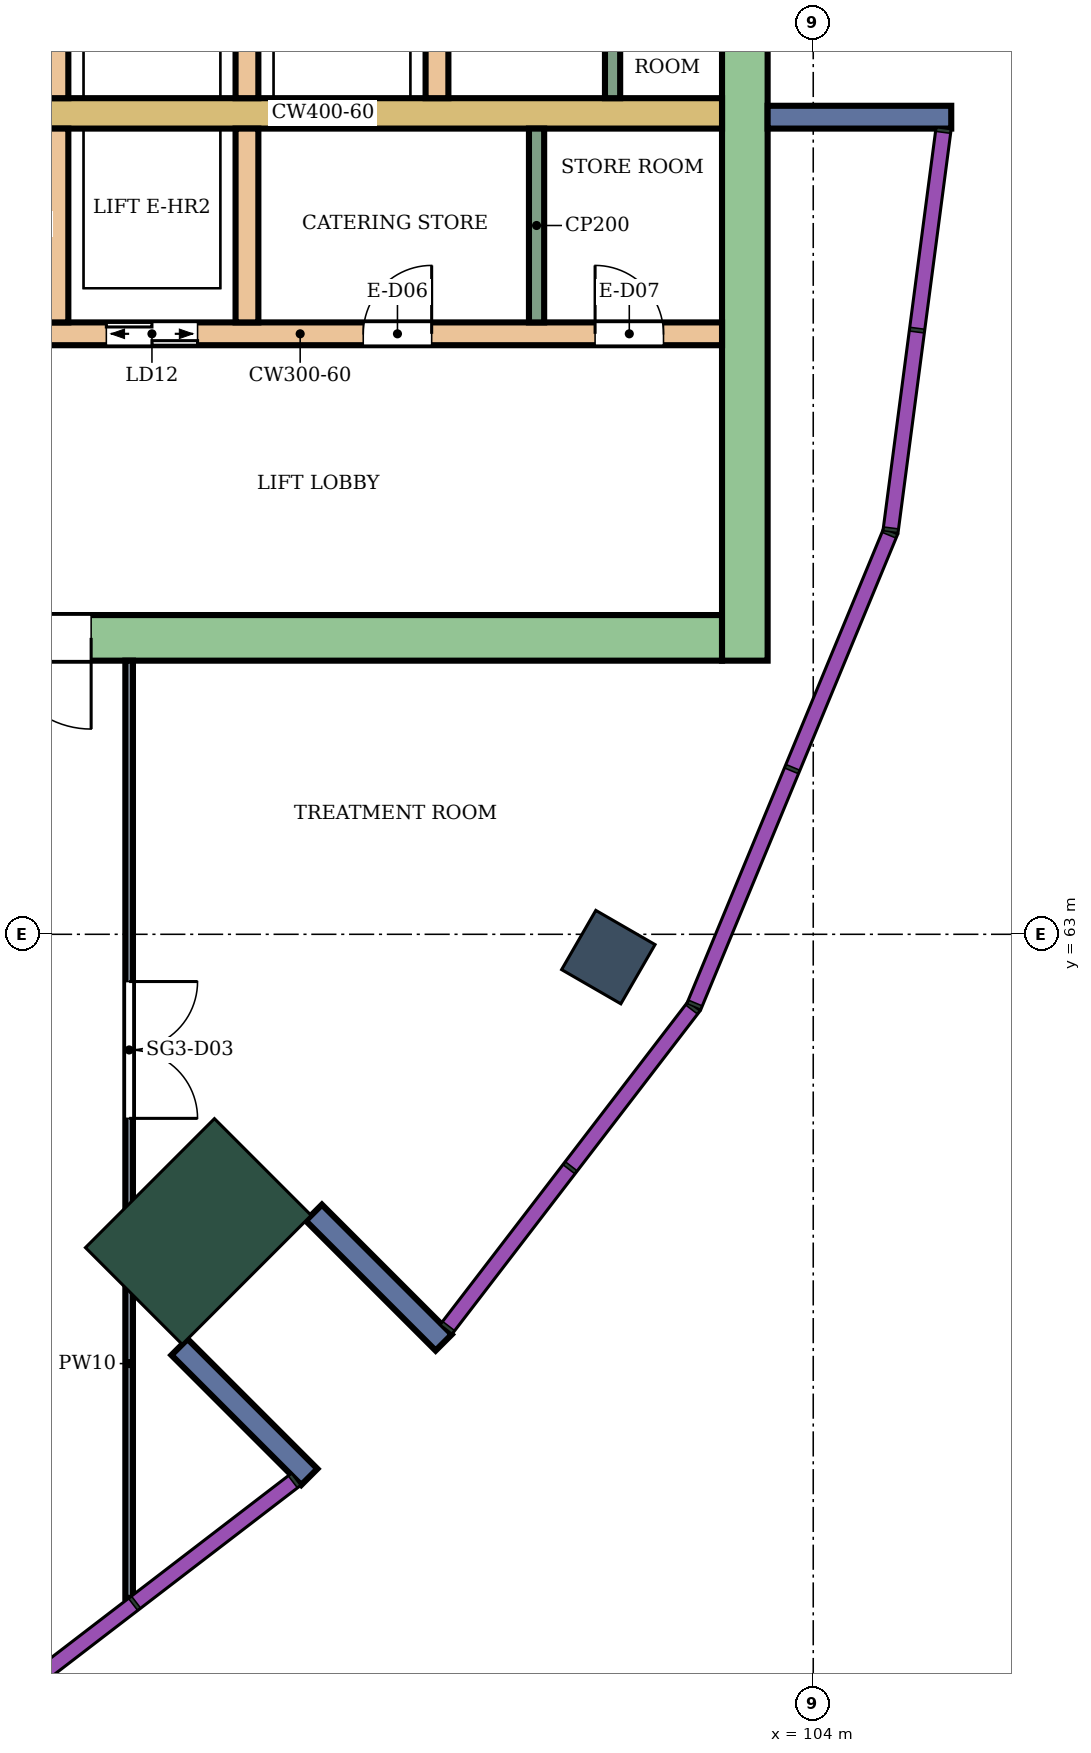
"""IFC4 building model, lengths in metres.
Left out: names, types, materials, properties, quantities, classifications, styles, units other than length and angle.
Written with IfcOpenShell. Run it as: python <this file> out.ifc"""

import sys

from ifc_helpers import new_model, si_unit, direction, frame, frame_2d, origin, origin_2d, place, context, subcontext, project, spatial, rectangle, extrude, element, fill, save


model = new_model("IFC4")
c1 = context("Model", 3, precision=1e-05, world=origin(), true_north=direction((0.0, 1.0)))
c2 = subcontext(c1, "Body", "Model", "MODEL_VIEW")
j1 = project(units=[si_unit("LENGTHUNIT", "METRE"), si_unit("PLANEANGLEUNIT", "RADIAN")], contexts=[c1])
p1 = place(None, origin())
s1 = spatial("IfcSite", under=j1, at=p1, CompositionType="ELEMENT")
p2 = place(p1, origin())
s2 = spatial("IfcBuilding", under=s1, at=p2, CompositionType="ELEMENT")
p3 = place(p2, frame((0.0, 0.0, 229.3)))
s3 = spatial("IfcBuildingStorey", under=s2, at=p3, CompositionType="ELEMENT", Elevation=229.3)
p4 = place(p3, frame((101.304, 62.7, 0.0), z_axis=(0.0, 0.0, 1.0), x_axis=(0.866025403784, -0.5, 0.0)))
e1 = element("IfcColumn", 1, at=p4, inside=s3, PredefinedType="COLUMN", context=c2, shape_type="SweptSolid", body=[
    extrude(rectangle(XDim=0.9, YDim=0.9, at=origin_2d()), origin(), (0.0, 0.0, 1.0), 8.0),
])
p5 = place(p3, frame((95.91, 59.09, 0.0), z_axis=(0.0, 0.0, 1.0), x_axis=(0.707106781187, -0.707106781187, 0.0)))
e2 = element("IfcColumn", 2, at=p5, inside=s3, PredefinedType="COLUMN", context=c2, shape_type="SweptSolid", body=[
    extrude(rectangle(XDim=1.8, YDim=2.4, at=origin_2d()), origin(), (0.0, 0.0, 1.0), 8.0),
])
p6 = place(p3, frame((87.9, 66.9, 0.0), z_axis=(0.0, 0.0, 1.0), x_axis=(1.0, 0.0, 0.0)))
e3 = element("IfcWall", 3, at=p6, inside=s3, PredefinedType="SHEAR", context=c2, shape_type="SweptSolid", body=[
    extrude(rectangle(XDim=14.9, YDim=0.6, at=frame_2d((7.45, 0.0))), origin(), (0.0, 0.0, 1.0), 7.68),
])
p7 = place(p6, frame((4.2, 0.0, 0.0)))
e4 = element("IfcOpeningElement", 4, at=p7, cuts=e3, PredefinedType="OPENING", context=c2, shape_type="SweptSolid", body=[
    extrude(rectangle(XDim=2.4, YDim=2.4, at=frame_2d((1.2, 1.2))), frame((0.0, 0.31, 0.0), z_axis=(0.0, -1.0, 0.0), x_axis=(1.0, 0.0, 0.0)), (0.0, 0.0, 1.0), 0.62),
])
p8 = place(p3, frame((103.1, 66.6, 0.0), z_axis=(0.0, 0.0, 1.0), x_axis=(0.0, 1.0, 0.0)))
e5 = element("IfcWall", 5, at=p8, inside=s3, PredefinedType="SHEAR", context=c2, shape_type="SweptSolid", body=[
    extrude(rectangle(XDim=16.8, YDim=0.6, at=frame_2d((8.4, 0.0))), origin(), (0.0, 0.0, 1.0), 7.68),
])
p9 = place(p3, frame((91.7, 73.8, 0.0), z_axis=(0.0, 0.0, 1.0), x_axis=(1.0, 0.0, 0.0)))
e6 = element("IfcWall", 6, at=p9, inside=s3, PredefinedType="SHEAR", context=c2, shape_type="SweptSolid", body=[
    extrude(rectangle(XDim=11.1, YDim=0.4, at=frame_2d((5.55, 0.0))), origin(), (0.0, 0.0, 1.0), 7.68),
])
p10 = place(p3, frame((91.7, 70.9, 0.0), z_axis=(0.0, 0.0, 1.0), x_axis=(1.0, 0.0, 0.0)))
e7 = element("IfcWall", 7, at=p10, inside=s3, PredefinedType="SHEAR", context=c2, shape_type="SweptSolid", body=[
    extrude(rectangle(XDim=11.1, YDim=0.3, at=frame_2d((5.55, 0.0))), origin(), (0.0, 0.0, 1.0), 7.68),
])
p11 = place(p10, frame((0.4, 0.0, 0.0)))
e8 = element("IfcOpeningElement", 8, at=p11, cuts=e7, PredefinedType="OPENING", context=c2, shape_type="SweptSolid", body=[
    extrude(rectangle(XDim=1.4, YDim=2.1, at=frame_2d((0.7, 1.05))), frame((0.0, 0.16, 0.0), z_axis=(0.0, -1.0, 0.0), x_axis=(1.0, 0.0, 0.0)), (0.0, 0.0, 1.0), 0.32),
])
p12 = place(p10, frame((3.0, 0.0, 0.0)))
e9 = element("IfcOpeningElement", 9, at=p12, cuts=e7, PredefinedType="OPENING", context=c2, shape_type="SweptSolid", body=[
    extrude(rectangle(XDim=1.2, YDim=2.1, at=frame_2d((0.6, 1.05))), frame((0.0, 0.16, 0.0), z_axis=(0.0, -1.0, 0.0), x_axis=(1.0, 0.0, 0.0)), (0.0, 0.0, 1.0), 0.32),
])
p13 = place(p10, frame((6.38, 0.0, 0.0)))
e10 = element("IfcOpeningElement", 10, at=p13, cuts=e7, PredefinedType="OPENING", context=c2, shape_type="SweptSolid", body=[
    extrude(rectangle(XDim=0.9, YDim=2.1, at=frame_2d((0.45, 1.05))), frame((0.0, 0.16, 0.0), z_axis=(0.0, -1.0, 0.0), x_axis=(1.0, 0.0, 0.0)), (0.0, 0.0, 1.0), 0.32),
])
p14 = place(p10, frame((9.43, 0.0, 0.0)))
e11 = element("IfcOpeningElement", 11, at=p14, cuts=e7, PredefinedType="OPENING", context=c2, shape_type="SweptSolid", body=[
    extrude(rectangle(XDim=0.9, YDim=2.1, at=frame_2d((0.45, 1.05))), frame((0.0, 0.16, 0.0), z_axis=(0.0, -1.0, 0.0), x_axis=(1.0, 0.0, 0.0)), (0.0, 0.0, 1.0), 0.32),
])
for number, where, z_axis, x_axis in (
    (12, (94.05, 74.0, 0.0), (0.0, 0.0, 1.0), (0.0, 1.0, 0.0)),
    (13, (96.55, 74.0, 0.0), (0.0, 0.0, 1.0), (0.0, 1.0, 0.0)),
    (14, (99.05, 74.0, 0.0), (0.0, 0.0, 1.0), (0.0, 1.0, 0.0)),
    (15, (94.05, 71.05, 0.0), (0.0, 0.0, 1.0), (0.0, 1.0, 0.0)),
    (16, (96.55, 71.05, 0.0), (0.0, 0.0, 1.0), (0.0, 1.0, 0.0)),
):
    element("IfcWall", number, at=place(p3, frame(where, z_axis=z_axis, x_axis=x_axis)), inside=s3, PredefinedType="SHEAR", context=c2, shape_type="SweptSolid", body=[
        extrude(rectangle(XDim=2.55, YDim=0.3, at=frame_2d((1.275, 0.0))), origin(), (0.0, 0.0, 1.0), 7.68),
    ])
for number, where, z_axis, x_axis in (
    (17, (103.4, 73.75, 0.0), (0.0, 0.0, 1.0), (1.0, 0.0, 0.0)),
    (18, (95.662, 57.57, 0.0), (0.0, 0.0, 1.0), (0.707, -0.707, 0.0)),
    (19, (97.43, 59.338, 0.0), (0.0, 0.0, 1.0), (0.707, -0.707, 0.0)),
):
    element("IfcWall", number, at=place(p3, frame(where, z_axis=z_axis, x_axis=x_axis)), inside=s3, PredefinedType="NOTDEFINED", context=c2, shape_type="SweptSolid", body=[
        extrude(rectangle(XDim=2.416, YDim=0.3, at=frame_2d((1.208, 0.0))), origin(), (0.0, 0.0, 1.0), 8.0),
    ])
p15 = place(p3, frame((95.0, 54.27, 0.0), z_axis=(0.0, 0.0, 1.0), x_axis=(0.0, 1.0, 0.0)))
e20 = element("IfcWall", 20, at=p15, inside=s3, PredefinedType="PARTITIONING", context=c2, shape_type="SweptSolid", body=[
    extrude(rectangle(XDim=12.33, YDim=0.1, at=frame_2d((6.165, 0.0))), origin(), (0.0, 0.0, 1.0), 7.55),
])
p16 = place(p15, frame((6.309, 0.0, 0.0)))
e21 = element("IfcOpeningElement", 21, at=p16, cuts=e20, PredefinedType="OPENING", context=c2, shape_type="SweptSolid", body=[
    extrude(rectangle(XDim=1.8, YDim=2.1, at=frame_2d((0.9, 1.05))), frame((0.0, 0.06, 0.0), z_axis=(0.0, -1.0, 0.0), x_axis=(1.0, 0.0, 0.0)), (0.0, 0.0, 1.0), 0.12),
])
for number, where, z_axis, x_axis in (
    (22, (101.36, 74.0, 0.0), (0.0, 0.0, 1.0), (0.0, 1.0, 0.0)),
    (23, (100.36, 71.05, 0.0), (0.0, 0.0, 1.0), (0.0, 1.0, 0.0)),
):
    element("IfcWall", number, at=place(p3, frame(where, z_axis=z_axis, x_axis=x_axis)), inside=s3, PredefinedType="PARTITIONING", context=c2, shape_type="SweptSolid", body=[
        extrude(rectangle(XDim=2.55, YDim=0.2, at=frame_2d((1.275, 0.0))), origin(), (0.0, 0.0, 1.0), 7.68),
    ])
p17 = place(p16, frame((1.8, 0.0, 0.0), z_axis=(0.0, 0.0, 1.0), x_axis=(-1.0, 0.0, 0.0)))
e24 = element("IfcDoor", 24, at=p17, inside=s3, OperationType="DOUBLE_DOOR_SINGLE_SWING", PredefinedType="DOOR", context=c2, shape_type="SweptSolid", body=[
    extrude(rectangle(XDim=1.8, YDim=2.1, at=frame_2d((0.9, 1.05))), frame((0.0, 0.025, 0.0), z_axis=(0.0, -1.0, 0.0), x_axis=(1.0, 0.0, 0.0)), (0.0, 0.0, 1.0), 0.05),
])
fill(e21, e24)
p18 = place(p12, origin())
e25 = element("IfcDoor", 25, at=p18, inside=s3, OperationType="DOUBLE_DOOR_SLIDING", PredefinedType="DOOR", context=c2, shape_type="SweptSolid", body=[
    extrude(rectangle(XDim=1.2, YDim=2.1, at=frame_2d((0.6, 1.05))), frame((0.0, 0.025, 0.0), z_axis=(0.0, -1.0, 0.0), x_axis=(1.0, 0.0, 0.0)), (0.0, 0.0, 1.0), 0.05),
])
fill(e9, e25)
p19 = place(p13, origin())
e26 = element("IfcDoor", 26, at=p19, inside=s3, OperationType="SINGLE_SWING_RIGHT", PredefinedType="DOOR", context=c2, shape_type="SweptSolid", body=[
    extrude(rectangle(XDim=0.9, YDim=2.1, at=frame_2d((0.45, 1.05))), frame((0.0, 0.025, 0.0), z_axis=(0.0, -1.0, 0.0), x_axis=(1.0, 0.0, 0.0)), (0.0, 0.0, 1.0), 0.05),
])
fill(e10, e26)
p20 = place(p14, origin())
e27 = element("IfcDoor", 27, at=p20, inside=s3, OperationType="SINGLE_SWING_LEFT", PredefinedType="DOOR", context=c2, shape_type="SweptSolid", body=[
    extrude(rectangle(XDim=0.9, YDim=2.1, at=frame_2d((0.45, 1.05))), frame((0.0, 0.025, 0.0), z_axis=(0.0, -1.0, 0.0), x_axis=(1.0, 0.0, 0.0)), (0.0, 0.0, 1.0), 0.05),
])
fill(e11, e27)
p21 = place(p7, frame((2.4, 0.0, 0.0), z_axis=(0.0, 0.0, 1.0), x_axis=(-1.0, 0.0, 0.0)))
e28 = element("IfcDoor", 28, at=p21, inside=s3, OperationType="DOUBLE_DOOR_SINGLE_SWING", PredefinedType="DOOR", context=c2, shape_type="SweptSolid", body=[
    extrude(rectangle(XDim=2.4, YDim=2.4, at=frame_2d((1.2, 1.2))), frame((0.0, 0.025, 0.0), z_axis=(0.0, -1.0, 0.0), x_axis=(1.0, 0.0, 0.0)), (0.0, 0.0, 1.0), 0.05),
])
fill(e4, e28)
save(model, sys.argv[1])
